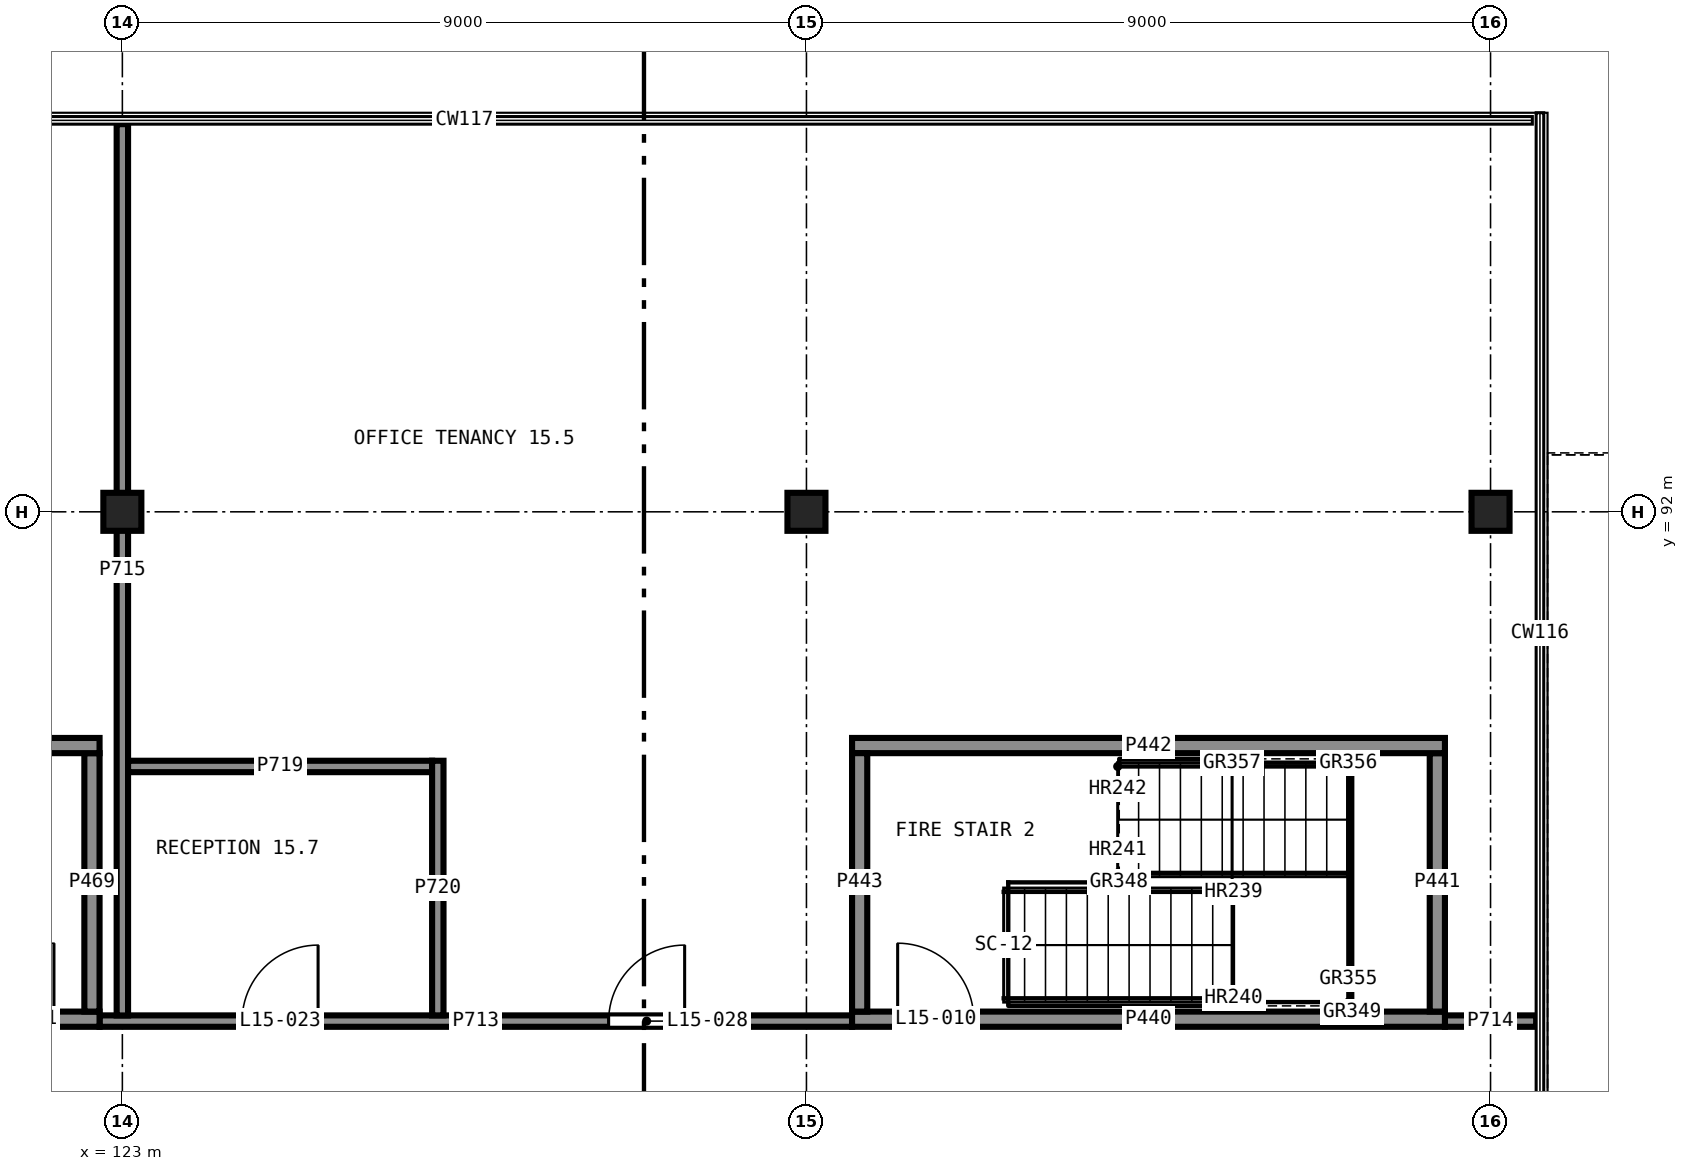
"""IFC4 building model, lengths in metres.
Left out: names, types, materials, properties, quantities, classifications, styles, units other than length and angle.
Written with IfcOpenShell. Run it as: python <this file> out.ifc"""

import sys

from ifc_helpers import new_model, si_unit, direction, frame, frame_2d, origin, origin_2d, place, context, subcontext, project, spatial, rectangle, extrude, element, fill, save


model = new_model("IFC4")
c1 = context("Model", 3, precision=1e-05, world=origin(), true_north=direction((0.0, 1.0)))
c2 = subcontext(c1, "Body", "Model", "MODEL_VIEW")
j1 = project(units=[si_unit("LENGTHUNIT", "METRE"), si_unit("PLANEANGLEUNIT", "RADIAN")], contexts=[c1])
p1 = place(None, origin())
s1 = spatial("IfcSite", under=j1, at=p1, CompositionType="ELEMENT")
p2 = place(p1, origin())
s2 = spatial("IfcBuilding", under=s1, at=p2, CompositionType="ELEMENT")
p3 = place(p2, frame((0.0, 0.0, 61.5)))
s3 = spatial("IfcBuildingStorey", under=s2, at=p3, CompositionType="ELEMENT", Elevation=61.5)
for number, where, z_axis, x_axis in (
    (1, (123.0, 92.0, 0.0), (0.0, 0.0, 1.0), (1.0, 0.0, 0.0)),
    (2, (132.0, 92.0, 0.0), (0.0, 0.0, 1.0), (1.0, 0.0, 0.0)),
    (3, (141.0, 92.0, 0.0), (0.0, 0.0, 1.0), (1.0, 0.0, 0.0)),
):
    element("IfcColumn", number, at=place(p3, frame(where, z_axis=z_axis, x_axis=x_axis)), inside=s3, PredefinedType="COLUMN", context=c2, shape_type="SweptSolid", body=[
        extrude(rectangle(XDim=0.5, YDim=0.5, at=origin_2d()), origin(), (0.0, 0.0, 1.0), 4.0),
    ])
p4 = place(p3, frame((132.6, 85.325, 0.0), z_axis=(0.0, 0.0, 1.0), x_axis=(1.0, 0.0, 0.0)))
e4 = element("IfcWall", 4, at=p4, inside=s3, PredefinedType="SHEAR", context=c2, shape_type="SweptSolid", body=[
    extrude(rectangle(XDim=7.8, YDim=0.2, at=frame_2d((3.9, 0.0))), origin(), (0.0, 0.0, 1.0), 3.58),
])
p5 = place(p4, frame((0.6, 0.0, 0.0)))
e5 = element("IfcOpeningElement", 5, at=p5, cuts=e4, PredefinedType="OPENING", context=c2, shape_type="SweptSolid", body=[
    extrude(rectangle(XDim=1.0, YDim=2.1, at=frame_2d((0.5, 1.05))), frame((0.0, 0.11, 0.0), z_axis=(0.0, -1.0, 0.0), x_axis=(1.0, 0.0, 0.0)), (0.0, 0.0, 1.0), 0.22),
])
p6 = place(p3, frame((140.3, 85.425, 0.0), z_axis=(0.0, 0.0, 1.0), x_axis=(0.0, 1.0, 0.0)))
e6 = element("IfcWall", 6, at=p6, inside=s3, PredefinedType="SHEAR", context=c2, shape_type="SweptSolid", body=[
    extrude(rectangle(XDim=3.4, YDim=0.2, at=frame_2d((1.7, 0.0))), origin(), (0.0, 0.0, 1.0), 3.58),
])
p7 = place(p3, frame((140.4, 88.925, 0.0), z_axis=(0.0, 0.0, 1.0), x_axis=(-1.0, 0.0, 0.0)))
e7 = element("IfcWall", 7, at=p7, inside=s3, PredefinedType="SHEAR", context=c2, shape_type="SweptSolid", body=[
    extrude(rectangle(XDim=7.8, YDim=0.2, at=frame_2d((3.9, 0.0))), origin(), (0.0, 0.0, 1.0), 3.58),
])
p8 = place(p3, frame((132.7, 88.825, 0.0), z_axis=(0.0, 0.0, 1.0), x_axis=(0.0, -1.0, 0.0)))
e8 = element("IfcWall", 8, at=p8, inside=s3, PredefinedType="SHEAR", context=c2, shape_type="SweptSolid", body=[
    extrude(rectangle(XDim=3.4, YDim=0.2, at=frame_2d((1.7, 0.0))), origin(), (0.0, 0.0, 1.0), 3.58),
])
p9 = place(p3, frame((114.9, 85.325, 0.0), z_axis=(0.0, 0.0, 1.0), x_axis=(1.0, 0.0, 0.0)))
e9 = element("IfcWall", 9, at=p9, inside=s3, PredefinedType="SHEAR", context=c2, shape_type="SweptSolid", body=[
    extrude(rectangle(XDim=7.8, YDim=0.2, at=frame_2d((3.9, 0.0))), origin(), (0.0, 0.0, 1.0), 3.58),
])
p10 = place(p9, frame((6.2, 0.0, 0.0)))
e10 = element("IfcOpeningElement", 10, at=p10, cuts=e9, PredefinedType="OPENING", context=c2, shape_type="SweptSolid", body=[
    extrude(rectangle(XDim=1.0, YDim=2.1, at=frame_2d((0.5, 1.05))), frame((0.0, 0.11, 0.0), z_axis=(0.0, -1.0, 0.0), x_axis=(1.0, 0.0, 0.0)), (0.0, 0.0, 1.0), 0.22),
])
p11 = place(p3, frame((122.6, 85.425, 0.0), z_axis=(0.0, 0.0, 1.0), x_axis=(0.0, 1.0, 0.0)))
e11 = element("IfcWall", 11, at=p11, inside=s3, PredefinedType="SHEAR", context=c2, shape_type="SweptSolid", body=[
    extrude(rectangle(XDim=3.4, YDim=0.2, at=frame_2d((1.7, 0.0))), origin(), (0.0, 0.0, 1.0), 3.58),
])
p12 = place(p3, frame((122.7, 88.925, 0.0), z_axis=(0.0, 0.0, 1.0), x_axis=(-1.0, 0.0, 0.0)))
e12 = element("IfcWall", 12, at=p12, inside=s3, PredefinedType="SHEAR", context=c2, shape_type="SweptSolid", body=[
    extrude(rectangle(XDim=7.8, YDim=0.2, at=frame_2d((3.9, 0.0))), origin(), (0.0, 0.0, 1.0), 3.58),
])
p13 = place(p3, frame((122.7, 85.3, 0.0), z_axis=(0.0, 0.0, 1.0), x_axis=(1.0, 0.0, 0.0)))
e13 = element("IfcWall", 13, at=p13, inside=s3, PredefinedType="PARTITIONING", context=c2, shape_type="SweptSolid", body=[
    extrude(rectangle(XDim=9.9, YDim=0.15, at=frame_2d((4.95, 0.0))), origin(), (0.0, 0.0, 1.0), 3.58),
])
p14 = place(p13, frame((1.875, 0.0, 0.0)))
e14 = element("IfcOpeningElement", 14, at=p14, cuts=e13, PredefinedType="OPENING", context=c2, shape_type="SweptSolid", body=[
    extrude(rectangle(XDim=1.0, YDim=2.1, at=frame_2d((0.5, 1.05))), frame((0.0, 0.085, 0.0), z_axis=(0.0, -1.0, 0.0), x_axis=(1.0, 0.0, 0.0)), (0.0, 0.0, 1.0), 0.17),
])
p15 = place(p13, frame((6.698, 0.0, 0.0)))
e15 = element("IfcOpeningElement", 15, at=p15, cuts=e13, PredefinedType="OPENING", context=c2, shape_type="SweptSolid", body=[
    extrude(rectangle(XDim=1.0, YDim=2.1, at=frame_2d((0.5, 1.05))), frame((0.0, 0.085, 0.0), z_axis=(0.0, -1.0, 0.0), x_axis=(1.0, 0.0, 0.0)), (0.0, 0.0, 1.0), 0.17),
])
p16 = place(p3, frame((140.4, 85.3, 0.0), z_axis=(0.0, 0.0, 1.0), x_axis=(1.0, 0.0, 0.0)))
e16 = element("IfcWall", 16, at=p16, inside=s3, PredefinedType="PARTITIONING", context=c2, shape_type="SweptSolid", body=[
    extrude(rectangle(XDim=1.2, YDim=0.15, at=frame_2d((0.6, 0.0))), origin(), (0.0, 0.0, 1.0), 3.58),
])
p17 = place(p3, frame((123.0, 85.374, 0.0), z_axis=(0.0, 0.0, 1.0), x_axis=(0.0, 1.0, 0.0)))
e17 = element("IfcWall", 17, at=p17, inside=s3, PredefinedType="PARTITIONING", context=c2, shape_type="SweptSolid", body=[
    extrude(rectangle(XDim=11.726, YDim=0.15, at=frame_2d((5.863, 0.0))), origin(), (0.0, 0.0, 1.0), 2.68),
])
p18 = place(p3, frame((123.075, 88.65, 0.0), z_axis=(0.0, 0.0, 1.0), x_axis=(1.0, 0.0, 0.0)))
e18 = element("IfcWall", 18, at=p18, inside=s3, PredefinedType="PARTITIONING", context=c2, shape_type="SweptSolid", body=[
    extrude(rectangle(XDim=4.0, YDim=0.15, at=frame_2d((2.0, 0.0))), origin(), (0.0, 0.0, 1.0), 3.58),
])
p19 = place(p3, frame((127.15, 85.375, 0.0), z_axis=(0.0, 0.0, 1.0), x_axis=(0.0, 1.0, 0.0)))
e19 = element("IfcWall", 19, at=p19, inside=s3, PredefinedType="PARTITIONING", context=c2, shape_type="SweptSolid", body=[
    extrude(rectangle(XDim=3.35, YDim=0.15, at=frame_2d((1.675, 0.0))), origin(), (0.0, 0.0, 1.0), 3.58),
])
p20 = place(p5, origin())
e20 = element("IfcDoor", 20, at=p20, inside=s3, OperationType="SINGLE_SWING_RIGHT", PredefinedType="DOOR", context=c2, shape_type="SweptSolid", body=[
    extrude(rectangle(XDim=1.0, YDim=2.1, at=frame_2d((0.5, 1.05))), frame((0.0, 0.025, 0.0), z_axis=(0.0, -1.0, 0.0), x_axis=(1.0, 0.0, 0.0)), (0.0, 0.0, 1.0), 0.05),
])
fill(e5, e20)
p21 = place(p10, origin())
e21 = element("IfcDoor", 21, at=p21, inside=s3, OperationType="SINGLE_SWING_LEFT", PredefinedType="DOOR", context=c2, shape_type="SweptSolid", body=[
    extrude(rectangle(XDim=1.0, YDim=2.1, at=frame_2d((0.5, 1.05))), frame((0.0, 0.025, 0.0), z_axis=(0.0, -1.0, 0.0), x_axis=(1.0, 0.0, 0.0)), (0.0, 0.0, 1.0), 0.05),
])
fill(e10, e21)
p22 = place(p14, origin())
e22 = element("IfcDoor", 22, at=p22, inside=s3, OperationType="SINGLE_SWING_LEFT", PredefinedType="DOOR", context=c2, shape_type="SweptSolid", body=[
    extrude(rectangle(XDim=1.0, YDim=2.1, at=frame_2d((0.5, 1.05))), frame((0.0, 0.025, 0.0), z_axis=(0.0, -1.0, 0.0), x_axis=(1.0, 0.0, 0.0)), (0.0, 0.0, 1.0), 0.05),
])
fill(e14, e22)
p23 = place(p15, origin())
e23 = element("IfcDoor", 23, at=p23, inside=s3, OperationType="SINGLE_SWING_LEFT", PredefinedType="DOOR", context=c2, shape_type="SweptSolid", body=[
    extrude(rectangle(XDim=1.0, YDim=2.1, at=frame_2d((0.5, 1.05))), frame((0.0, 0.025, 0.0), z_axis=(0.0, -1.0, 0.0), x_axis=(1.0, 0.0, 0.0)), (0.0, 0.0, 1.0), 0.05),
])
fill(e15, e23)
save(model, sys.argv[1])
